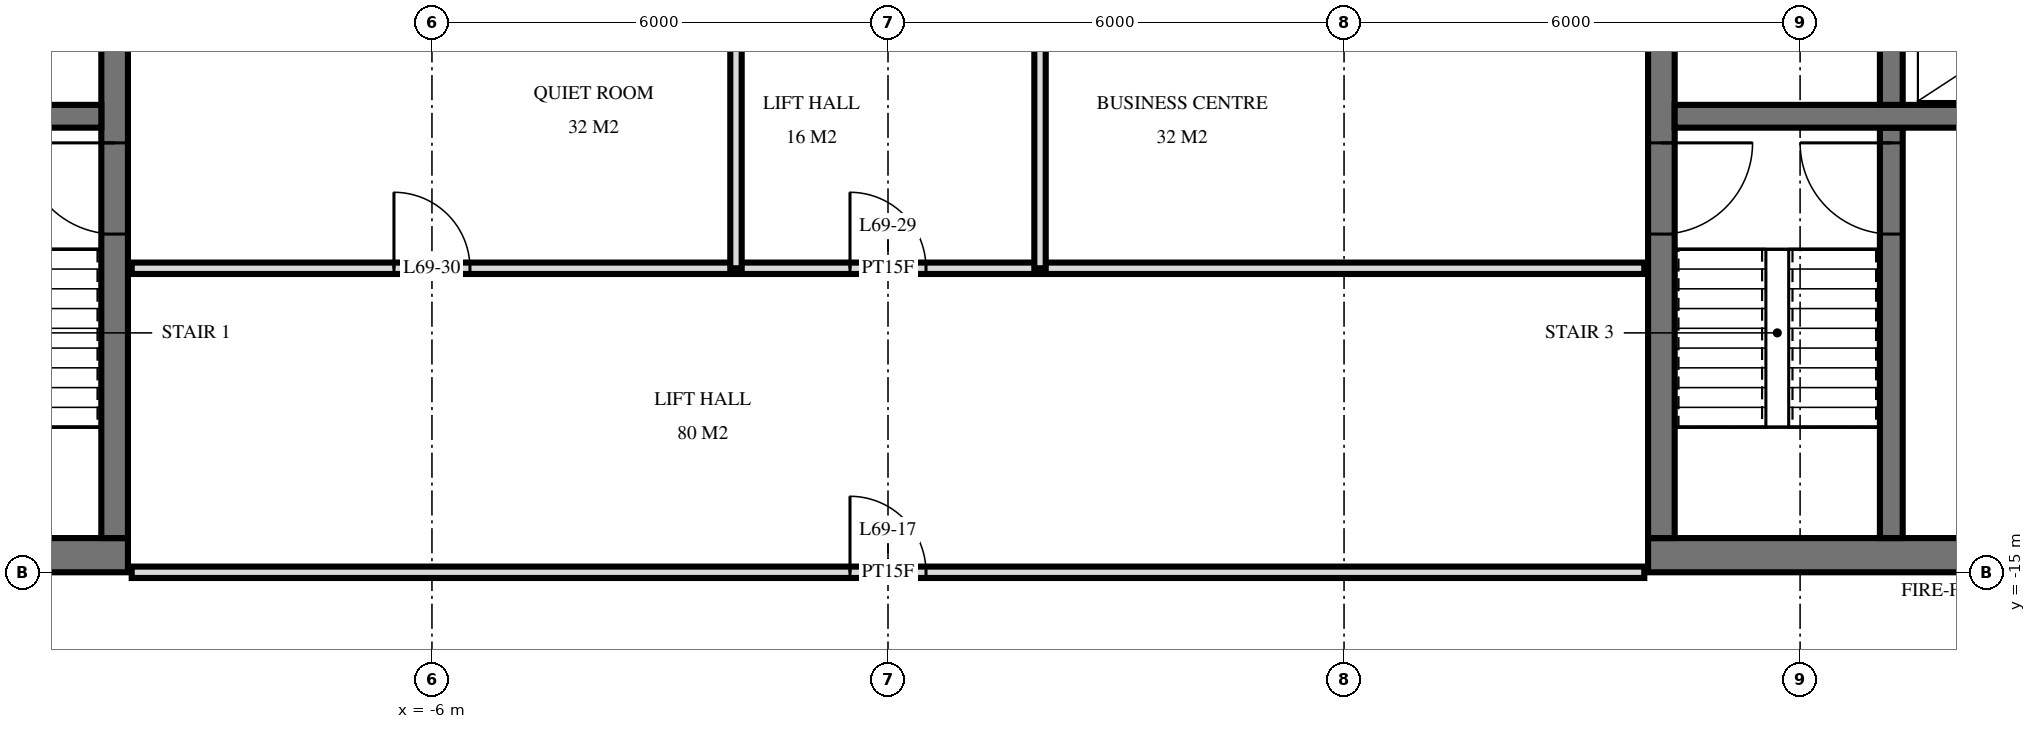
"""IFC4 building model, lengths in metres.
Left out: names, types, materials, properties, quantities, classifications, styles, units other than length and angle.
Written with IfcOpenShell. Run it as: python <this file> out.ifc"""

import sys

from ifc_helpers import new_model, si_unit, direction, frame, frame_2d, origin, place, context, subcontext, project, spatial, rectangle, extrude, element, fill, save


model = new_model("IFC4")
c1 = context("Model", 3, precision=1e-05, world=origin(), true_north=direction((0.0, 1.0)))
c2 = subcontext(c1, "Body", "Model", "MODEL_VIEW")
j1 = project(units=[si_unit("LENGTHUNIT", "METRE"), si_unit("PLANEANGLEUNIT", "RADIAN")], contexts=[c1])
p1 = place(None, origin())
s1 = spatial("IfcSite", under=j1, at=p1, CompositionType="ELEMENT")
p2 = place(p1, origin())
s2 = spatial("IfcBuilding", under=s1, at=p2, CompositionType="ELEMENT")
p3 = place(p2, frame((0.0, 0.0, 263.1)))
s3 = spatial("IfcBuildingStorey", under=s2, at=p3, CompositionType="ELEMENT", Elevation=263.1)
p4 = place(p3, frame((-19.5, -14.775, 0.0), z_axis=(0.0, 0.0, 1.0), x_axis=(1.0, 0.0, 0.0)))
e1 = element("IfcWall", 1, at=p4, inside=s3, PredefinedType="SHEAR", context=c2, shape_type="SweptSolid", body=[
    extrude(rectangle(XDim=9.5, YDim=0.45, at=frame_2d((4.75, 0.0))), origin(), (0.0, 0.0, 1.0), 3.5),
])
p5 = place(p4, frame((1.2, 0.0, 0.0)))
e2 = element("IfcOpeningElement", 2, at=p5, cuts=e1, PredefinedType="OPENING", context=c2, shape_type="SweptSolid", body=[
    extrude(rectangle(XDim=1.2, YDim=2.1, at=frame_2d((0.6, 1.05))), frame((0.0, 0.235, 0.0), z_axis=(0.0, -1.0, 0.0), x_axis=(1.0, 0.0, 0.0)), (0.0, 0.0, 1.0), 0.47),
])
p6 = place(p4, frame((4.25, 0.0, 0.0)))
e3 = element("IfcOpeningElement", 3, at=p6, cuts=e1, PredefinedType="OPENING", context=c2, shape_type="SweptSolid", body=[
    extrude(rectangle(XDim=1.1, YDim=2.1, at=frame_2d((0.55, 1.05))), frame((0.0, 0.235, 0.0), z_axis=(0.0, -1.0, 0.0), x_axis=(1.0, 0.0, 0.0)), (0.0, 0.0, 1.0), 0.47),
])
p7 = place(p3, frame((-10.175, -14.55, 0.0), z_axis=(0.0, 0.0, 1.0), x_axis=(0.0, 1.0, 0.0)))
e4 = element("IfcWall", 4, at=p7, inside=s3, PredefinedType="SHEAR", context=c2, shape_type="SweptSolid", body=[
    extrude(rectangle(XDim=14.1, YDim=0.35, at=frame_2d((7.05, 0.0))), origin(), (0.0, 0.0, 1.0), 3.5),
])
p8 = place(p7, frame((8.4, 0.0, 0.0)))
e5 = element("IfcOpeningElement", 5, at=p8, cuts=e4, PredefinedType="OPENING", context=c2, shape_type="SweptSolid", body=[
    extrude(rectangle(XDim=1.4, YDim=2.4, at=frame_2d((0.7, 1.2))), frame((0.0, 0.185, 0.0), z_axis=(0.0, -1.0, 0.0), x_axis=(1.0, 0.0, 0.0)), (0.0, 0.0, 1.0), 0.37),
])
p9 = place(p7, frame((10.0, 0.0, 0.0)))
e6 = element("IfcOpeningElement", 6, at=p9, cuts=e4, PredefinedType="OPENING", context=c2, shape_type="SweptSolid", body=[
    extrude(rectangle(XDim=1.4, YDim=2.4, at=frame_2d((0.7, 1.2))), frame((0.0, 0.185, 0.0), z_axis=(0.0, -1.0, 0.0), x_axis=(1.0, 0.0, 0.0)), (0.0, 0.0, 1.0), 0.37),
])
p10 = place(p7, frame((4.0, 0.0, 0.0)))
e7 = element("IfcOpeningElement", 7, at=p10, cuts=e4, PredefinedType="OPENING", context=c2, shape_type="SweptSolid", body=[
    extrude(rectangle(XDim=1.2, YDim=2.1, at=frame_2d((0.6, 1.05))), frame((0.0, 0.185, 0.0), z_axis=(0.0, -1.0, 0.0), x_axis=(1.0, 0.0, 0.0)), (0.0, 0.0, 1.0), 0.37),
])
p11 = place(p3, frame((-19.05, -9.0, 0.0), z_axis=(0.0, 0.0, 1.0), x_axis=(1.0, 0.0, 0.0)))
e8 = element("IfcWall", 8, at=p11, inside=s3, PredefinedType="SHEAR", context=c2, shape_type="SweptSolid", body=[
    extrude(rectangle(XDim=8.7, YDim=0.3, at=frame_2d((4.35, 0.0))), origin(), (0.0, 0.0, 1.0), 3.5),
])
p12 = place(p11, frame((3.8, 0.0, 0.0)))
e9 = element("IfcOpeningElement", 9, at=p12, cuts=e8, PredefinedType="OPENING", context=c2, shape_type="SweptSolid", body=[
    extrude(rectangle(XDim=1.1, YDim=2.1, at=frame_2d((0.55, 1.05))), frame((0.0, 0.16, 0.0), z_axis=(0.0, -1.0, 0.0), x_axis=(1.0, 0.0, 0.0)), (0.0, 0.0, 1.0), 0.32),
])
p13 = place(p3, frame((10.0, -14.775, 0.0), z_axis=(0.0, 0.0, 1.0), x_axis=(1.0, 0.0, 0.0)))
e10 = element("IfcWall", 10, at=p13, inside=s3, PredefinedType="SHEAR", context=c2, shape_type="SweptSolid", body=[
    extrude(rectangle(XDim=9.5, YDim=0.45, at=frame_2d((4.75, 0.0))), origin(), (0.0, 0.0, 1.0), 3.5),
])
p14 = place(p13, frame((7.1, 0.0, 0.0)))
e11 = element("IfcOpeningElement", 11, at=p14, cuts=e10, PredefinedType="OPENING", context=c2, shape_type="SweptSolid", body=[
    extrude(rectangle(XDim=1.2, YDim=2.1, at=frame_2d((0.6, 1.05))), frame((0.0, 0.235, 0.0), z_axis=(0.0, -1.0, 0.0), x_axis=(1.0, 0.0, 0.0)), (0.0, 0.0, 1.0), 0.47),
])
p15 = place(p13, frame((4.15, 0.0, 0.0)))
e12 = element("IfcOpeningElement", 12, at=p15, cuts=e10, PredefinedType="OPENING", context=c2, shape_type="SweptSolid", body=[
    extrude(rectangle(XDim=1.1, YDim=2.1, at=frame_2d((0.55, 1.05))), frame((0.0, 0.235, 0.0), z_axis=(0.0, -1.0, 0.0), x_axis=(1.0, 0.0, 0.0)), (0.0, 0.0, 1.0), 0.47),
])
p16 = place(p3, frame((10.175, -14.55, 0.0), z_axis=(0.0, 0.0, 1.0), x_axis=(0.0, 1.0, 0.0)))
e13 = element("IfcWall", 13, at=p16, inside=s3, PredefinedType="SHEAR", context=c2, shape_type="SweptSolid", body=[
    extrude(rectangle(XDim=14.1, YDim=0.35, at=frame_2d((7.05, 0.0))), origin(), (0.0, 0.0, 1.0), 3.5),
])
p17 = place(p16, frame((8.4, 0.0, 0.0)))
e14 = element("IfcOpeningElement", 14, at=p17, cuts=e13, PredefinedType="OPENING", context=c2, shape_type="SweptSolid", body=[
    extrude(rectangle(XDim=1.4, YDim=2.4, at=frame_2d((0.7, 1.2))), frame((0.0, 0.185, 0.0), z_axis=(0.0, -1.0, 0.0), x_axis=(1.0, 0.0, 0.0)), (0.0, 0.0, 1.0), 0.37),
])
p18 = place(p16, frame((10.0, 0.0, 0.0)))
e15 = element("IfcOpeningElement", 15, at=p18, cuts=e13, PredefinedType="OPENING", context=c2, shape_type="SweptSolid", body=[
    extrude(rectangle(XDim=1.4, YDim=2.4, at=frame_2d((0.7, 1.2))), frame((0.0, 0.185, 0.0), z_axis=(0.0, -1.0, 0.0), x_axis=(1.0, 0.0, 0.0)), (0.0, 0.0, 1.0), 0.37),
])
p19 = place(p16, frame((4.0, 0.0, 0.0)))
e16 = element("IfcOpeningElement", 16, at=p19, cuts=e13, PredefinedType="OPENING", context=c2, shape_type="SweptSolid", body=[
    extrude(rectangle(XDim=1.2, YDim=2.1, at=frame_2d((0.6, 1.05))), frame((0.0, 0.185, 0.0), z_axis=(0.0, -1.0, 0.0), x_axis=(1.0, 0.0, 0.0)), (0.0, 0.0, 1.0), 0.37),
])
p20 = place(p3, frame((10.35, -9.0, 0.0), z_axis=(0.0, 0.0, 1.0), x_axis=(1.0, 0.0, 0.0)))
e17 = element("IfcWall", 17, at=p20, inside=s3, PredefinedType="SHEAR", context=c2, shape_type="SweptSolid", body=[
    extrude(rectangle(XDim=8.7, YDim=0.3, at=frame_2d((4.35, 0.0))), origin(), (0.0, 0.0, 1.0), 3.5),
])
p21 = place(p20, frame((3.8, 0.0, 0.0)))
e18 = element("IfcOpeningElement", 18, at=p21, cuts=e17, PredefinedType="OPENING", context=c2, shape_type="SweptSolid", body=[
    extrude(rectangle(XDim=1.1, YDim=2.1, at=frame_2d((0.55, 1.05))), frame((0.0, 0.16, 0.0), z_axis=(0.0, -1.0, 0.0), x_axis=(1.0, 0.0, 0.0)), (0.0, 0.0, 1.0), 0.32),
])
p22 = place(p3, frame((13.2, -8.85, 0.0), z_axis=(0.0, 0.0, 1.0), x_axis=(0.0, 1.0, 0.0)))
e19 = element("IfcWall", 19, at=p22, inside=s3, PredefinedType="SHEAR", context=c2, shape_type="SweptSolid", body=[
    extrude(rectangle(XDim=2.3, YDim=0.3, at=frame_2d((1.15, 0.0))), origin(), (0.0, 0.0, 1.0), 3.5),
])
p23 = place(p3, frame((13.2, -14.55, 0.0), z_axis=(0.0, 0.0, 1.0), x_axis=(0.0, 1.0, 0.0)))
e20 = element("IfcWall", 20, at=p23, inside=s3, PredefinedType="SHEAR", context=c2, shape_type="SweptSolid", body=[
    extrude(rectangle(XDim=5.4, YDim=0.3, at=frame_2d((2.7, 0.0))), origin(), (0.0, 0.0, 1.0), 3.5),
])
p24 = place(p23, frame((4.0, 0.0, 0.0)))
e21 = element("IfcOpeningElement", 21, at=p24, cuts=e20, PredefinedType="OPENING", context=c2, shape_type="SweptSolid", body=[
    extrude(rectangle(XDim=1.2, YDim=2.1, at=frame_2d((0.6, 1.05))), frame((0.0, 0.16, 0.0), z_axis=(0.0, -1.0, 0.0), x_axis=(1.0, 0.0, 0.0)), (0.0, 0.0, 1.0), 0.32),
])
for number, where, z_axis, x_axis in (
    (22, (2.0, -11.0, 0.0), (0.0, 0.0, 1.0), (0.0, 1.0, 0.0)),
    (23, (-2.0, -11.0, 0.0), (0.0, 0.0, 1.0), (0.0, 1.0, 0.0)),
):
    element("IfcWall", number, at=place(p3, frame(where, z_axis=z_axis, x_axis=x_axis)), inside=s3, PredefinedType="PARTITIONING", context=c2, shape_type="SweptSolid", body=[
        extrude(rectangle(XDim=4.0, YDim=0.15, at=frame_2d((2.0, 0.0))), origin(), (0.0, 0.0, 1.0), 3.22),
    ])
p25 = place(p3, frame((-9.95, -15.0, 0.0), z_axis=(0.0, 0.0, 1.0), x_axis=(1.0, 0.0, 0.0)))
e24 = element("IfcWall", 24, at=p25, inside=s3, PredefinedType="PARTITIONING", context=c2, shape_type="SweptSolid", body=[
    extrude(rectangle(XDim=19.9, YDim=0.15, at=frame_2d((9.95, 0.0))), origin(), (0.0, 0.0, 1.0), 2.584),
])
p26 = place(p25, frame((9.45, 0.0, 0.0)))
e25 = element("IfcOpeningElement", 25, at=p26, cuts=e24, PredefinedType="OPENING", context=c2, shape_type="SweptSolid", body=[
    extrude(rectangle(XDim=1.0, YDim=2.1, at=frame_2d((0.5, 1.05))), frame((0.0, 0.085, 0.0), z_axis=(0.0, -1.0, 0.0), x_axis=(1.0, 0.0, 0.0)), (0.0, 0.0, 1.0), 0.17),
])
p27 = place(p3, frame((-9.95, -11.0, 0.0), z_axis=(0.0, 0.0, 1.0), x_axis=(1.0, 0.0, 0.0)))
e26 = element("IfcWall", 26, at=p27, inside=s3, PredefinedType="PARTITIONING", context=c2, shape_type="SweptSolid", body=[
    extrude(rectangle(XDim=19.9, YDim=0.15, at=frame_2d((9.95, 0.0))), origin(), (0.0, 0.0, 1.0), 3.22),
])
p28 = place(p27, frame((9.45, 0.0, 0.0)))
e27 = element("IfcOpeningElement", 27, at=p28, cuts=e26, PredefinedType="OPENING", context=c2, shape_type="SweptSolid", body=[
    extrude(rectangle(XDim=1.0, YDim=2.1, at=frame_2d((0.5, 1.05))), frame((0.0, 0.085, 0.0), z_axis=(0.0, -1.0, 0.0), x_axis=(1.0, 0.0, 0.0)), (0.0, 0.0, 1.0), 0.17),
])
p29 = place(p27, frame((3.45, 0.0, 0.0)))
e28 = element("IfcOpeningElement", 28, at=p29, cuts=e26, PredefinedType="OPENING", context=c2, shape_type="SweptSolid", body=[
    extrude(rectangle(XDim=1.0, YDim=2.1, at=frame_2d((0.5, 1.05))), frame((0.0, 0.085, 0.0), z_axis=(0.0, -1.0, 0.0), x_axis=(1.0, 0.0, 0.0)), (0.0, 0.0, 1.0), 0.17),
])
p30 = place(p10, origin())
e29 = element("IfcDoor", 29, at=p30, inside=s3, OperationType="SINGLE_SWING_LEFT", PredefinedType="DOOR", context=c2, shape_type="SweptSolid", body=[
    extrude(rectangle(XDim=1.2, YDim=2.1, at=frame_2d((0.6, 1.05))), frame((0.0, 0.025, 0.0), z_axis=(0.0, -1.0, 0.0), x_axis=(1.0, 0.0, 0.0)), (0.0, 0.0, 1.0), 0.05),
])
fill(e7, e29)
p31 = place(p19, frame((0.6, 0.0, 0.0), z_axis=(0.0, 0.0, 1.0), x_axis=(-1.0, 0.0, 0.0)))
e30 = element("IfcDoor", 30, at=p31, inside=s3, OperationType="SINGLE_SWING_RIGHT", PredefinedType="DOOR", context=c2, shape_type="SweptSolid", body=[
    extrude(rectangle(XDim=1.2, YDim=2.1, at=frame_2d((0.0, 1.05))), frame((0.0, -0.025, 0.0), z_axis=(0.0, 1.0, 0.0), x_axis=(-1.0, 0.0, 0.0)), (0.0, 0.0, 1.0), 0.05),
])
fill(e16, e30)
p32 = place(p24, origin())
e31 = element("IfcDoor", 31, at=p32, inside=s3, OperationType="SINGLE_SWING_LEFT", PredefinedType="DOOR", context=c2, shape_type="SweptSolid", body=[
    extrude(rectangle(XDim=1.2, YDim=2.1, at=frame_2d((0.6, 1.05))), frame((0.0, 0.025, 0.0), z_axis=(0.0, -1.0, 0.0), x_axis=(1.0, 0.0, 0.0)), (0.0, 0.0, 1.0), 0.05),
])
fill(e21, e31)
p33 = place(p26, origin())
e32 = element("IfcDoor", 32, at=p33, inside=s3, OperationType="SINGLE_SWING_RIGHT", PredefinedType="DOOR", context=c2, shape_type="SweptSolid", body=[
    extrude(rectangle(XDim=1.0, YDim=2.1, at=frame_2d((0.5, 1.05))), frame((0.0, 0.025, 0.0), z_axis=(0.0, -1.0, 0.0), x_axis=(1.0, 0.0, 0.0)), (0.0, 0.0, 1.0), 0.05),
])
fill(e25, e32)
p34 = place(p28, origin())
e33 = element("IfcDoor", 33, at=p34, inside=s3, OperationType="SINGLE_SWING_RIGHT", PredefinedType="DOOR", context=c2, shape_type="SweptSolid", body=[
    extrude(rectangle(XDim=1.0, YDim=2.1, at=frame_2d((0.5, 1.05))), frame((0.0, 0.025, 0.0), z_axis=(0.0, -1.0, 0.0), x_axis=(1.0, 0.0, 0.0)), (0.0, 0.0, 1.0), 0.05),
])
fill(e27, e33)
p35 = place(p29, origin())
e34 = element("IfcDoor", 34, at=p35, inside=s3, OperationType="SINGLE_SWING_RIGHT", PredefinedType="DOOR", context=c2, shape_type="SweptSolid", body=[
    extrude(rectangle(XDim=1.0, YDim=2.1, at=frame_2d((0.5, 1.05))), frame((0.0, 0.025, 0.0), z_axis=(0.0, -1.0, 0.0), x_axis=(1.0, 0.0, 0.0)), (0.0, 0.0, 1.0), 0.05),
])
fill(e28, e34)
save(model, sys.argv[1])
